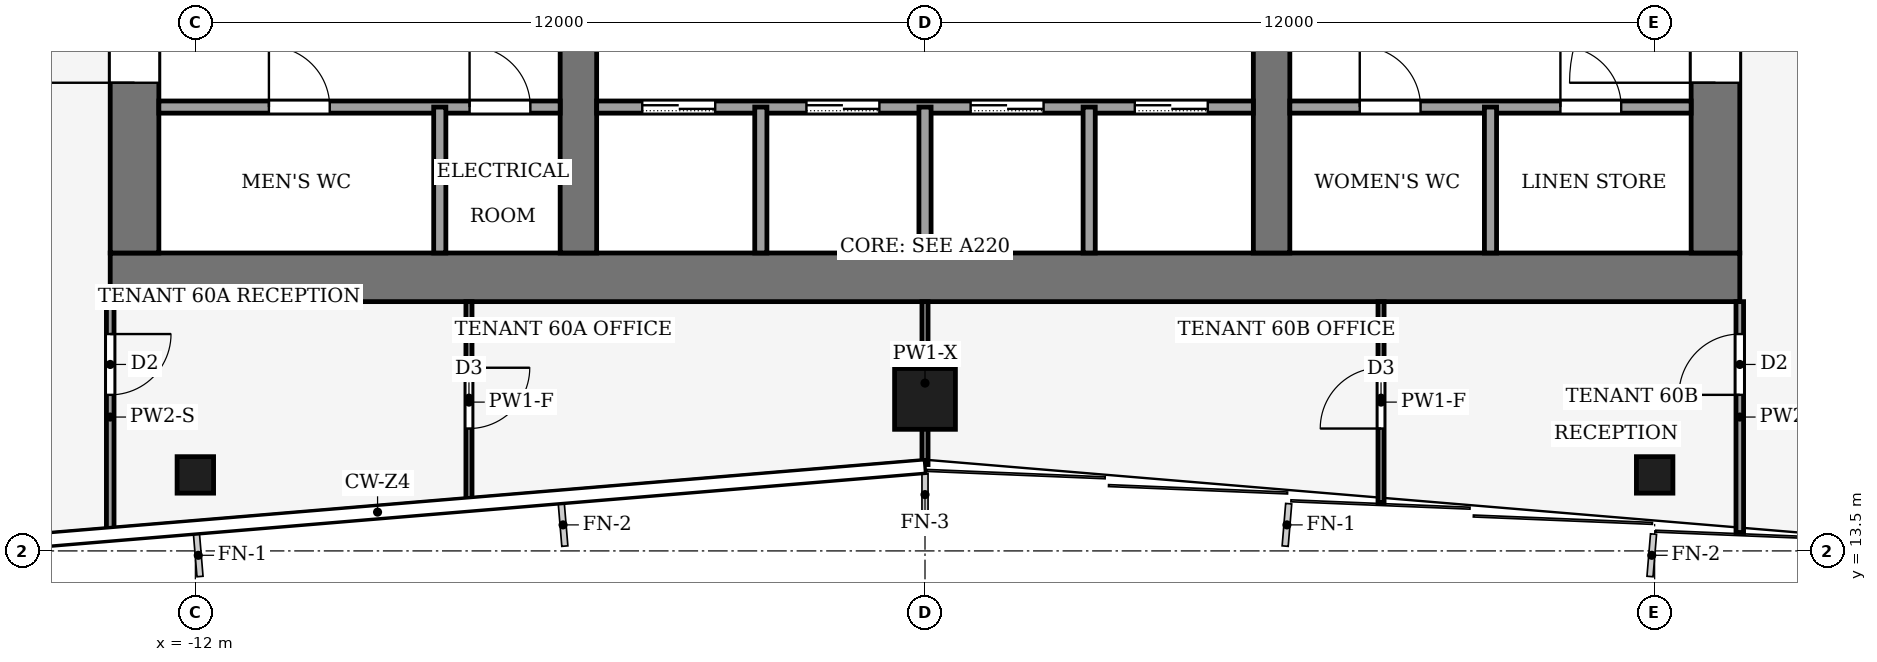
"""IFC4 building model, lengths in metres.
Left out: names, types, materials, properties, quantities, classifications, styles, units other than length and angle.
Written with IfcOpenShell. Run it as: python <this file> out.ifc"""

import sys

from ifc_helpers import new_model, si_unit, direction, frame, frame_2d, origin, origin_2d, place, context, subcontext, project, spatial, rectangle, hollow_rectangle, extrude, element, fill, save


model = new_model("IFC4")
c1 = context("Model", 3, precision=1e-05, world=origin(), true_north=direction((0.0, 1.0)))
c2 = subcontext(c1, "Body", "Model", "MODEL_VIEW")
j1 = project(units=[si_unit("LENGTHUNIT", "METRE"), si_unit("PLANEANGLEUNIT", "RADIAN")], contexts=[c1])
p1 = place(None, origin())
s1 = spatial("IfcSite", under=j1, at=p1, CompositionType="ELEMENT")
p2 = place(p1, origin())
s2 = spatial("IfcBuilding", under=s1, at=p2, CompositionType="ELEMENT")
p3 = place(p2, frame((0.0, 0.0, 262.0)))
s3 = spatial("IfcBuildingStorey", under=s2, at=p3, CompositionType="ELEMENT", Elevation=262.0)
p4 = place(p3, frame((-13.4, 18.0, -0.13), z_axis=(0.0, 0.0, 1.0), x_axis=(1.0, 0.0, 0.0)))
e1 = element("IfcWall", 1, at=p4, inside=s3, PredefinedType="SHEAR", context=c2, shape_type="SweptSolid", body=[
    extrude(rectangle(XDim=26.8, YDim=0.8, at=frame_2d((13.4, 0.0))), origin(), (0.0, 0.0, 1.0), 4.0),
])
p5 = place(p3, frame((-13.0, 18.4, -0.13), z_axis=(0.0, 0.0, 1.0), x_axis=(0.0, 1.0, 0.0)))
e2 = element("IfcWall", 2, at=p5, inside=s3, PredefinedType="SHEAR", context=c2, shape_type="SweptSolid", body=[
    extrude(rectangle(XDim=19.2, YDim=0.8, at=frame_2d((9.6, 0.0))), origin(), (0.0, 0.0, 1.0), 4.0),
])
p6 = place(p5, frame((2.8, 0.0, 0.13)))
e3 = element("IfcOpeningElement", 3, at=p6, cuts=e2, PredefinedType="OPENING", context=c2, shape_type="SweptSolid", body=[
    extrude(rectangle(XDim=2.4, YDim=2.4, at=frame_2d((1.2, 1.2))), frame((0.0, 0.41, 0.0), z_axis=(0.0, -1.0, 0.0), x_axis=(1.0, 0.0, 0.0)), (0.0, 0.0, 1.0), 0.82),
])
p7 = place(p5, frame((13.4, 0.0, 0.13)))
e4 = element("IfcOpeningElement", 4, at=p7, cuts=e2, PredefinedType="OPENING", context=c2, shape_type="SweptSolid", body=[
    extrude(rectangle(XDim=1.4, YDim=2.2, at=frame_2d((0.7, 1.1))), frame((0.0, 0.41, 0.0), z_axis=(0.0, -1.0, 0.0), x_axis=(1.0, 0.0, 0.0)), (0.0, 0.0, 1.0), 0.82),
])
p8 = place(p3, frame((13.0, 18.4, -0.13), z_axis=(0.0, 0.0, 1.0), x_axis=(0.0, 1.0, 0.0)))
e5 = element("IfcWall", 5, at=p8, inside=s3, PredefinedType="SHEAR", context=c2, shape_type="SweptSolid", body=[
    extrude(rectangle(XDim=19.2, YDim=0.8, at=frame_2d((9.6, 0.0))), origin(), (0.0, 0.0, 1.0), 4.0),
])
p9 = place(p8, frame((2.8, 0.0, 0.13)))
e6 = element("IfcOpeningElement", 6, at=p9, cuts=e5, PredefinedType="OPENING", context=c2, shape_type="SweptSolid", body=[
    extrude(rectangle(XDim=2.4, YDim=2.4, at=frame_2d((1.2, 1.2))), frame((0.0, 0.41, 0.0), z_axis=(0.0, -1.0, 0.0), x_axis=(1.0, 0.0, 0.0)), (0.0, 0.0, 1.0), 0.82),
])
p10 = place(p8, frame((13.3, 0.0, 0.13)))
e7 = element("IfcOpeningElement", 7, at=p10, cuts=e5, PredefinedType="OPENING", context=c2, shape_type="SweptSolid", body=[
    extrude(rectangle(XDim=2.4, YDim=2.4, at=frame_2d((1.2, 1.2))), frame((0.0, 0.41, 0.0), z_axis=(0.0, -1.0, 0.0), x_axis=(1.0, 0.0, 0.0)), (0.0, 0.0, 1.0), 0.82),
])
p11 = place(p3, frame((-5.7, 18.4, -0.13), z_axis=(0.0, 0.0, 1.0), x_axis=(0.0, 1.0, 0.0)))
e8 = element("IfcWall", 8, at=p11, inside=s3, PredefinedType="SHEAR", context=c2, shape_type="SweptSolid", body=[
    extrude(rectangle(XDim=19.2, YDim=0.6, at=frame_2d((9.6, 0.0))), origin(), (0.0, 0.0, 1.0), 4.0),
])
p12 = place(p11, frame((8.35, 0.0, 0.13)))
e9 = element("IfcOpeningElement", 9, at=p12, cuts=e8, PredefinedType="OPENING", context=c2, shape_type="SweptSolid", body=[
    extrude(rectangle(XDim=0.9, YDim=2.1, at=frame_2d((0.45, 1.05))), frame((0.0, 0.31, 0.0), z_axis=(0.0, -1.0, 0.0), x_axis=(1.0, 0.0, 0.0)), (0.0, 0.0, 1.0), 0.62),
])
p13 = place(p3, frame((5.7, 18.4, -0.13), z_axis=(0.0, 0.0, 1.0), x_axis=(0.0, 1.0, 0.0)))
e10 = element("IfcWall", 10, at=p13, inside=s3, PredefinedType="SHEAR", context=c2, shape_type="SweptSolid", body=[
    extrude(rectangle(XDim=19.2, YDim=0.6, at=frame_2d((9.6, 0.0))), origin(), (0.0, 0.0, 1.0), 4.0),
])
p14 = place(p13, frame((8.35, 0.0, 0.13)))
e11 = element("IfcOpeningElement", 11, at=p14, cuts=e10, PredefinedType="OPENING", context=c2, shape_type="SweptSolid", body=[
    extrude(rectangle(XDim=0.9, YDim=2.1, at=frame_2d((0.45, 1.05))), frame((0.0, 0.31, 0.0), z_axis=(0.0, -1.0, 0.0), x_axis=(1.0, 0.0, 0.0)), (0.0, 0.0, 1.0), 0.62),
])
p15 = place(p13, frame((13.3, 0.0, 0.13)))
e12 = element("IfcOpeningElement", 12, at=p15, cuts=e10, PredefinedType="OPENING", context=c2, shape_type="SweptSolid", body=[
    extrude(rectangle(XDim=2.4, YDim=2.4, at=frame_2d((1.2, 1.2))), frame((0.0, 0.31, 0.0), z_axis=(0.0, -1.0, 0.0), x_axis=(1.0, 0.0, 0.0)), (0.0, 0.0, 1.0), 0.62),
])
p16 = place(p3, frame((0.0, 16.0, 0.0), z_axis=(0.0, 0.0, 1.0), x_axis=(1.0, 0.0, 0.0)))
e13 = element("IfcColumn", 13, at=p16, inside=s3, PredefinedType="COLUMN", context=c2, shape_type="SweptSolid", body=[
    extrude(hollow_rectangle(XDim=1.0, YDim=1.0, WallThickness=0.045, at=origin_2d()), origin(), (0.0, 0.0, 1.0), 4.0),
])
for number, where, z_axis, x_axis in (
    (14, (-12.0, 14.75, 0.0), (0.0, 0.0, 1.0), (1.0, 0.0, 0.0)),
    (15, (12.0, 14.75, 0.0), (0.0, 0.0, 1.0), (1.0, 0.0, 0.0)),
):
    element("IfcColumn", number, at=place(p3, frame(where, z_axis=z_axis, x_axis=x_axis)), inside=s3, PredefinedType="COLUMN", context=c2, shape_type="SweptSolid", body=[
        extrude(hollow_rectangle(XDim=0.6, YDim=0.6, WallThickness=0.025, at=origin_2d()), origin(), (0.0, 0.0, 1.0), 4.0),
    ])
p17 = place(p3, frame((-12.6, 20.8, 0.0), z_axis=(0.0, 0.0, 1.0), x_axis=(1.0, 0.0, 0.0)))
e16 = element("IfcWall", 16, at=p17, inside=s3, PredefinedType="PARTITIONING", context=c2, shape_type="SweptSolid", body=[
    extrude(rectangle(XDim=6.6, YDim=0.2, at=frame_2d((3.3, 0.0))), origin(), (0.0, 0.0, 1.0), 3.87),
])
p18 = place(p17, frame((1.81, 0.0, 0.0)))
e17 = element("IfcOpeningElement", 17, at=p18, cuts=e16, PredefinedType="OPENING", context=c2, shape_type="SweptSolid", body=[
    extrude(rectangle(XDim=1.0, YDim=2.1, at=frame_2d((0.5, 1.05))), frame((0.0, 0.11, 0.0), z_axis=(0.0, -1.0, 0.0), x_axis=(1.0, 0.0, 0.0)), (0.0, 0.0, 1.0), 0.22),
])
p19 = place(p17, frame((5.11, 0.0, 0.0)))
e18 = element("IfcOpeningElement", 18, at=p19, cuts=e16, PredefinedType="OPENING", context=c2, shape_type="SweptSolid", body=[
    extrude(rectangle(XDim=1.0, YDim=2.1, at=frame_2d((0.5, 1.05))), frame((0.0, 0.11, 0.0), z_axis=(0.0, -1.0, 0.0), x_axis=(1.0, 0.0, 0.0)), (0.0, 0.0, 1.0), 0.22),
])
p20 = place(p3, frame((-5.4, 20.8, 0.0), z_axis=(0.0, 0.0, 1.0), x_axis=(1.0, 0.0, 0.0)))
e19 = element("IfcWall", 19, at=p20, inside=s3, PredefinedType="PARTITIONING", context=c2, shape_type="SweptSolid", body=[
    extrude(rectangle(XDim=10.8, YDim=0.2, at=frame_2d((5.4, 0.0))), origin(), (0.0, 0.0, 1.0), 3.87),
])
p21 = place(p20, frame((0.75, 0.0, 0.0)))
e20 = element("IfcOpeningElement", 20, at=p21, cuts=e19, PredefinedType="OPENING", context=c2, shape_type="SweptSolid", body=[
    extrude(rectangle(XDim=1.2, YDim=2.2, at=frame_2d((0.6, 1.1))), frame((0.0, 0.11, 0.0), z_axis=(0.0, -1.0, 0.0), x_axis=(1.0, 0.0, 0.0)), (0.0, 0.0, 1.0), 0.22),
])
p22 = place(p20, frame((3.45, 0.0, 0.0)))
e21 = element("IfcOpeningElement", 21, at=p22, cuts=e19, PredefinedType="OPENING", context=c2, shape_type="SweptSolid", body=[
    extrude(rectangle(XDim=1.2, YDim=2.2, at=frame_2d((0.6, 1.1))), frame((0.0, 0.11, 0.0), z_axis=(0.0, -1.0, 0.0), x_axis=(1.0, 0.0, 0.0)), (0.0, 0.0, 1.0), 0.22),
])
p23 = place(p20, frame((6.15, 0.0, 0.0)))
e22 = element("IfcOpeningElement", 22, at=p23, cuts=e19, PredefinedType="OPENING", context=c2, shape_type="SweptSolid", body=[
    extrude(rectangle(XDim=1.2, YDim=2.2, at=frame_2d((0.6, 1.1))), frame((0.0, 0.11, 0.0), z_axis=(0.0, -1.0, 0.0), x_axis=(1.0, 0.0, 0.0)), (0.0, 0.0, 1.0), 0.22),
])
p24 = place(p20, frame((8.85, 0.0, 0.0)))
e23 = element("IfcOpeningElement", 23, at=p24, cuts=e19, PredefinedType="OPENING", context=c2, shape_type="SweptSolid", body=[
    extrude(rectangle(XDim=1.2, YDim=2.2, at=frame_2d((0.6, 1.1))), frame((0.0, 0.11, 0.0), z_axis=(0.0, -1.0, 0.0), x_axis=(1.0, 0.0, 0.0)), (0.0, 0.0, 1.0), 0.22),
])
p25 = place(p3, frame((6.0, 20.8, 0.0), z_axis=(0.0, 0.0, 1.0), x_axis=(1.0, 0.0, 0.0)))
e24 = element("IfcWall", 24, at=p25, inside=s3, PredefinedType="PARTITIONING", context=c2, shape_type="SweptSolid", body=[
    extrude(rectangle(XDim=6.6, YDim=0.2, at=frame_2d((3.3, 0.0))), origin(), (0.0, 0.0, 1.0), 3.87),
])
p26 = place(p25, frame((1.15, 0.0, 0.0)))
e25 = element("IfcOpeningElement", 25, at=p26, cuts=e24, PredefinedType="OPENING", context=c2, shape_type="SweptSolid", body=[
    extrude(rectangle(XDim=1.0, YDim=2.1, at=frame_2d((0.5, 1.05))), frame((0.0, 0.11, 0.0), z_axis=(0.0, -1.0, 0.0), x_axis=(1.0, 0.0, 0.0)), (0.0, 0.0, 1.0), 0.22),
])
p27 = place(p25, frame((4.45, 0.0, 0.0)))
e26 = element("IfcOpeningElement", 26, at=p27, cuts=e24, PredefinedType="OPENING", context=c2, shape_type="SweptSolid", body=[
    extrude(rectangle(XDim=1.0, YDim=2.1, at=frame_2d((0.5, 1.05))), frame((0.0, 0.11, 0.0), z_axis=(0.0, -1.0, 0.0), x_axis=(1.0, 0.0, 0.0)), (0.0, 0.0, 1.0), 0.22),
])
for number, where, z_axis, x_axis in (
    (27, (-7.98, 18.4, 0.0), (0.0, 0.0, 1.0), (0.0, 1.0, 0.0)),
    (28, (-2.7, 18.4, 0.0), (0.0, 0.0, 1.0), (0.0, 1.0, 0.0)),
    (29, (0.0, 18.4, 0.0), (0.0, 0.0, 1.0), (0.0, 1.0, 0.0)),
    (30, (2.7, 18.4, 0.0), (0.0, 0.0, 1.0), (0.0, 1.0, 0.0)),
    (31, (9.3, 18.4, 0.0), (0.0, 0.0, 1.0), (0.0, 1.0, 0.0)),
):
    element("IfcWall", number, at=place(p3, frame(where, z_axis=z_axis, x_axis=x_axis)), inside=s3, PredefinedType="PARTITIONING", context=c2, shape_type="SweptSolid", body=[
        extrude(rectangle(XDim=2.4, YDim=0.2, at=frame_2d((1.2, 0.0))), origin(), (0.0, 0.0, 1.0), 3.87),
    ])
p28 = place(p3, frame((-13.4, 17.6, 0.0), z_axis=(0.0, 0.0, 1.0), x_axis=(0.0, -1.0, 0.0)))
e32 = element("IfcWall", 32, at=p28, inside=s3, PredefinedType="PARTITIONING", context=c2, shape_type="SweptSolid", body=[
    extrude(rectangle(XDim=3.797, YDim=0.125, at=frame_2d((1.898, 0.0))), origin(), (0.0, 0.0, 1.0), 3.04),
])
p29 = place(p28, frame((0.533, 0.0, 0.0)))
e33 = element("IfcOpeningElement", 33, at=p29, cuts=e32, PredefinedType="OPENING", context=c2, shape_type="SweptSolid", body=[
    extrude(rectangle(XDim=1.0, YDim=2.1, at=frame_2d((0.5, 1.05))), frame((0.0, 0.073, 0.0), z_axis=(0.0, -1.0, 0.0), x_axis=(1.0, 0.0, 0.0)), (0.0, 0.0, 1.0), 0.145),
])
p30 = place(p3, frame((13.4, 13.803, 0.0), z_axis=(0.0, 0.0, 1.0), x_axis=(0.0, 1.0, 0.0)))
e34 = element("IfcWall", 34, at=p30, inside=s3, PredefinedType="PARTITIONING", context=c2, shape_type="SweptSolid", body=[
    extrude(rectangle(XDim=3.797, YDim=0.125, at=frame_2d((1.898, 0.0))), origin(), (0.0, 0.0, 1.0), 3.04),
])
p31 = place(p30, frame((2.263, 0.0, 0.0)))
e35 = element("IfcOpeningElement", 35, at=p31, cuts=e34, PredefinedType="OPENING", context=c2, shape_type="SweptSolid", body=[
    extrude(rectangle(XDim=1.0, YDim=2.1, at=frame_2d((0.5, 1.05))), frame((0.0, 0.073, 0.0), z_axis=(0.0, -1.0, 0.0), x_axis=(1.0, 0.0, 0.0)), (0.0, 0.0, 1.0), 0.145),
])
p32 = place(p3, frame((-7.5, 17.6, 0.0), z_axis=(0.0, 0.0, 1.0), x_axis=(0.0, -1.0, 0.0)))
e36 = element("IfcWall", 36, at=p32, inside=s3, PredefinedType="PARTITIONING", context=c2, shape_type="SweptSolid", body=[
    extrude(rectangle(XDim=3.305, YDim=0.1, at=frame_2d((1.653, 0.0))), origin(), (0.0, 0.0, 1.0), 3.04),
])
p33 = place(p32, frame((1.087, 0.0, 0.0)))
e37 = element("IfcOpeningElement", 37, at=p33, cuts=e36, PredefinedType="OPENING", context=c2, shape_type="SweptSolid", body=[
    extrude(rectangle(XDim=1.0, YDim=2.1, at=frame_2d((0.5, 1.05))), frame((0.0, 0.06, 0.0), z_axis=(0.0, -1.0, 0.0), x_axis=(1.0, 0.0, 0.0)), (0.0, 0.0, 1.0), 0.12),
])
p34 = place(p3, frame((0.0, 14.92, 0.0), z_axis=(0.0, 0.0, 1.0), x_axis=(0.0, 1.0, 0.0)))
e38 = element("IfcWall", 38, at=p34, inside=s3, PredefinedType="PARTITIONING", context=c2, shape_type="SweptSolid", body=[
    extrude(rectangle(XDim=2.68, YDim=0.1, at=frame_2d((1.34, 0.0))), origin(), (0.0, 0.0, 1.0), 3.54),
])
p35 = place(p3, frame((7.5, 14.295, 0.0), z_axis=(0.0, 0.0, 1.0), x_axis=(0.0, 1.0, 0.0)))
e39 = element("IfcWall", 39, at=p35, inside=s3, PredefinedType="PARTITIONING", context=c2, shape_type="SweptSolid", body=[
    extrude(rectangle(XDim=3.305, YDim=0.1, at=frame_2d((1.653, 0.0))), origin(), (0.0, 0.0, 1.0), 3.04),
])
p36 = place(p35, frame((1.218, 0.0, 0.0)))
e40 = element("IfcOpeningElement", 40, at=p36, cuts=e39, PredefinedType="OPENING", context=c2, shape_type="SweptSolid", body=[
    extrude(rectangle(XDim=1.0, YDim=2.1, at=frame_2d((0.5, 1.05))), frame((0.0, 0.06, 0.0), z_axis=(0.0, -1.0, 0.0), x_axis=(1.0, 0.0, 0.0)), (0.0, 0.0, 1.0), 0.12),
])
p37 = place(p21, origin())
e41 = element("IfcDoor", 41, at=p37, inside=s3, OperationType="SLIDING_TO_LEFT", PredefinedType="DOOR", context=c2, shape_type="SweptSolid", body=[
    extrude(rectangle(XDim=1.2, YDim=2.2, at=frame_2d((0.6, 1.1))), frame((0.0, 0.025, 0.0), z_axis=(0.0, -1.0, 0.0), x_axis=(1.0, 0.0, 0.0)), (0.0, 0.0, 1.0), 0.05),
])
fill(e20, e41)
p38 = place(p22, origin())
e42 = element("IfcDoor", 42, at=p38, inside=s3, OperationType="SLIDING_TO_LEFT", PredefinedType="DOOR", context=c2, shape_type="SweptSolid", body=[
    extrude(rectangle(XDim=1.2, YDim=2.2, at=frame_2d((0.6, 1.1))), frame((0.0, 0.025, 0.0), z_axis=(0.0, -1.0, 0.0), x_axis=(1.0, 0.0, 0.0)), (0.0, 0.0, 1.0), 0.05),
])
fill(e21, e42)
p39 = place(p23, origin())
e43 = element("IfcDoor", 43, at=p39, inside=s3, OperationType="SLIDING_TO_LEFT", PredefinedType="DOOR", context=c2, shape_type="SweptSolid", body=[
    extrude(rectangle(XDim=1.2, YDim=2.2, at=frame_2d((0.6, 1.1))), frame((0.0, 0.025, 0.0), z_axis=(0.0, -1.0, 0.0), x_axis=(1.0, 0.0, 0.0)), (0.0, 0.0, 1.0), 0.05),
])
fill(e22, e43)
p40 = place(p24, origin())
e44 = element("IfcDoor", 44, at=p40, inside=s3, OperationType="SLIDING_TO_LEFT", PredefinedType="DOOR", context=c2, shape_type="SweptSolid", body=[
    extrude(rectangle(XDim=1.2, YDim=2.2, at=frame_2d((0.6, 1.1))), frame((0.0, 0.025, 0.0), z_axis=(0.0, -1.0, 0.0), x_axis=(1.0, 0.0, 0.0)), (0.0, 0.0, 1.0), 0.05),
])
fill(e23, e44)
p41 = place(p18, origin())
e45 = element("IfcDoor", 45, at=p41, inside=s3, OperationType="SINGLE_SWING_LEFT", PredefinedType="DOOR", context=c2, shape_type="SweptSolid", body=[
    extrude(rectangle(XDim=1.0, YDim=2.1, at=frame_2d((0.5, 1.05))), frame((0.0, 0.025, 0.0), z_axis=(0.0, -1.0, 0.0), x_axis=(1.0, 0.0, 0.0)), (0.0, 0.0, 1.0), 0.05),
])
fill(e17, e45)
p42 = place(p19, origin())
e46 = element("IfcDoor", 46, at=p42, inside=s3, OperationType="SINGLE_SWING_LEFT", PredefinedType="DOOR", context=c2, shape_type="SweptSolid", body=[
    extrude(rectangle(XDim=1.0, YDim=2.1, at=frame_2d((0.5, 1.05))), frame((0.0, 0.025, 0.0), z_axis=(0.0, -1.0, 0.0), x_axis=(1.0, 0.0, 0.0)), (0.0, 0.0, 1.0), 0.05),
])
fill(e18, e46)
p43 = place(p26, origin())
e47 = element("IfcDoor", 47, at=p43, inside=s3, OperationType="SINGLE_SWING_LEFT", PredefinedType="DOOR", context=c2, shape_type="SweptSolid", body=[
    extrude(rectangle(XDim=1.0, YDim=2.1, at=frame_2d((0.5, 1.05))), frame((0.0, 0.025, 0.0), z_axis=(0.0, -1.0, 0.0), x_axis=(1.0, 0.0, 0.0)), (0.0, 0.0, 1.0), 0.05),
])
fill(e25, e47)
p44 = place(p27, origin())
e48 = element("IfcDoor", 48, at=p44, inside=s3, OperationType="SINGLE_SWING_LEFT", PredefinedType="DOOR", context=c2, shape_type="SweptSolid", body=[
    extrude(rectangle(XDim=1.0, YDim=2.1, at=frame_2d((0.5, 1.05))), frame((0.0, 0.025, 0.0), z_axis=(0.0, -1.0, 0.0), x_axis=(1.0, 0.0, 0.0)), (0.0, 0.0, 1.0), 0.05),
])
fill(e26, e48)
p45 = place(p6, origin())
e49 = element("IfcDoor", 49, at=p45, inside=s3, OperationType="DOUBLE_DOOR_SINGLE_SWING", PredefinedType="DOOR", context=c2, shape_type="SweptSolid", body=[
    extrude(rectangle(XDim=2.4, YDim=2.4, at=frame_2d((1.2, 1.2))), frame((0.0, 0.025, 0.0), z_axis=(0.0, -1.0, 0.0), x_axis=(1.0, 0.0, 0.0)), (0.0, 0.0, 1.0), 0.05),
])
fill(e3, e49)
p46 = place(p9, origin())
e50 = element("IfcDoor", 50, at=p46, inside=s3, OperationType="DOUBLE_DOOR_SINGLE_SWING", PredefinedType="DOOR", context=c2, shape_type="SweptSolid", body=[
    extrude(rectangle(XDim=2.4, YDim=2.4, at=frame_2d((1.2, 1.2))), frame((0.0, 0.025, 0.0), z_axis=(0.0, -1.0, 0.0), x_axis=(1.0, 0.0, 0.0)), (0.0, 0.0, 1.0), 0.05),
])
fill(e6, e50)
p47 = place(p29, origin())
e51 = element("IfcDoor", 51, at=p47, inside=s3, OperationType="SINGLE_SWING_LEFT", PredefinedType="DOOR", context=c2, shape_type="SweptSolid", body=[
    extrude(rectangle(XDim=1.0, YDim=2.1, at=frame_2d((0.5, 1.05))), frame((0.0, 0.025, 0.0), z_axis=(0.0, -1.0, 0.0), x_axis=(1.0, 0.0, 0.0)), (0.0, 0.0, 1.0), 0.05),
])
fill(e33, e51)
p48 = place(p31, origin())
e52 = element("IfcDoor", 52, at=p48, inside=s3, OperationType="SINGLE_SWING_RIGHT", PredefinedType="DOOR", context=c2, shape_type="SweptSolid", body=[
    extrude(rectangle(XDim=1.0, YDim=2.1, at=frame_2d((0.5, 1.05))), frame((0.0, 0.025, 0.0), z_axis=(0.0, -1.0, 0.0), x_axis=(1.0, 0.0, 0.0)), (0.0, 0.0, 1.0), 0.05),
])
fill(e35, e52)
p49 = place(p33, origin())
e53 = element("IfcDoor", 53, at=p49, inside=s3, OperationType="SINGLE_SWING_LEFT", PredefinedType="DOOR", context=c2, shape_type="SweptSolid", body=[
    extrude(rectangle(XDim=1.0, YDim=2.1, at=frame_2d((0.5, 1.05))), frame((0.0, 0.025, 0.0), z_axis=(0.0, -1.0, 0.0), x_axis=(1.0, 0.0, 0.0)), (0.0, 0.0, 1.0), 0.05),
])
fill(e37, e53)
p50 = place(p36, origin())
e54 = element("IfcDoor", 54, at=p50, inside=s3, OperationType="SINGLE_SWING_RIGHT", PredefinedType="DOOR", context=c2, shape_type="SweptSolid", body=[
    extrude(rectangle(XDim=1.0, YDim=2.1, at=frame_2d((0.5, 1.05))), frame((0.0, 0.025, 0.0), z_axis=(0.0, -1.0, 0.0), x_axis=(1.0, 0.0, 0.0)), (0.0, 0.0, 1.0), 0.05),
])
fill(e40, e54)
save(model, sys.argv[1])
